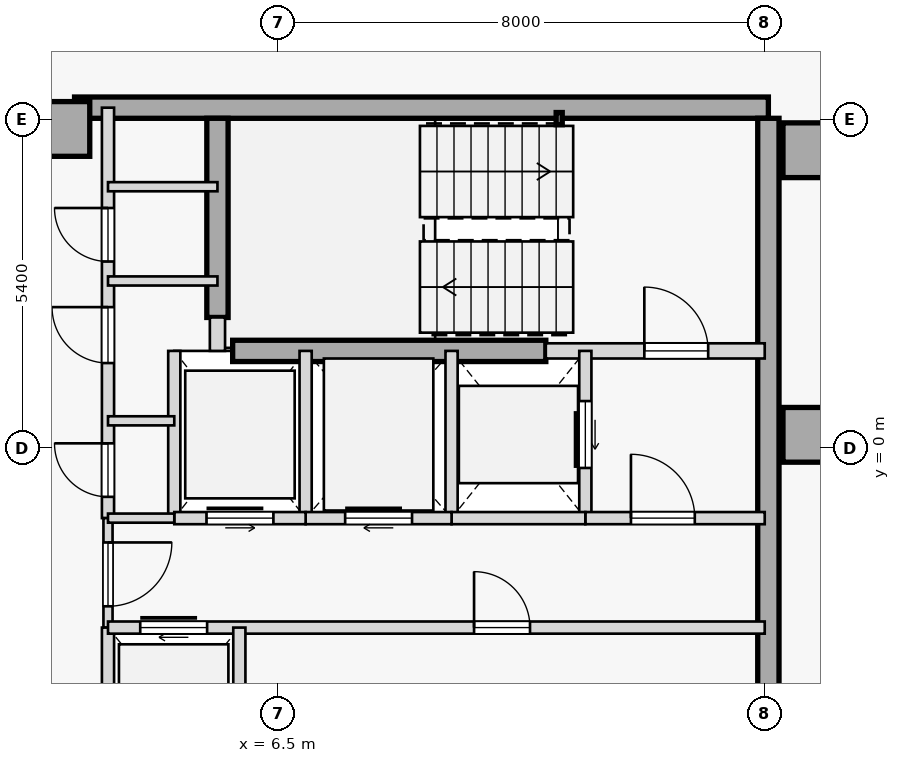
"""IFC4 building model, lengths in metres.
Left out: names, types, materials, properties, quantities, classifications, styles, units other than length and angle.
Written with IfcOpenShell. Run it as: python <this file> out.ifc"""

import sys

from ifc_helpers import new_model, si_unit, direction, frame, frame_2d, origin, origin_2d, place, context, subcontext, project, spatial, rectangle, hollow_rectangle, extrude, element, fill, save


model = new_model("IFC4")
c1 = context("Model", 3, precision=1e-05, world=origin(), true_north=direction((0.0, 1.0)))
c2 = subcontext(c1, "Body", "Model", "MODEL_VIEW")
j1 = project(units=[si_unit("LENGTHUNIT", "METRE"), si_unit("PLANEANGLEUNIT", "RADIAN")], contexts=[c1])
p1 = place(None, origin())
s1 = spatial("IfcSite", under=j1, at=p1, CompositionType="ELEMENT")
p2 = place(p1, origin())
s2 = spatial("IfcBuilding", under=s1, at=p2, CompositionType="ELEMENT")
p3 = place(p2, frame((0.0, 0.0, 298.65)))
s3 = spatial("IfcBuildingStorey", under=s2, at=p3, CompositionType="ELEMENT", Elevation=298.65)
for number, where, z_axis, x_axis in (
    (1, (15.25, 4.9, 0.0), (0.0, 0.0, 1.0), (1.0, 0.0, 0.0)),
    (2, (15.25, 0.22, 0.0), (0.0, 0.0, 1.0), (1.0, 0.0, 0.0)),
    (3, (2.95, 5.25, 0.0), (0.0, 0.0, 1.0), (1.0, 0.0, 0.0)),
):
    element("IfcColumn", number, at=place(p3, frame(where, z_axis=z_axis, x_axis=x_axis)), inside=s3, PredefinedType="COLUMN", context=c2, shape_type="SweptSolid", body=[
        extrude(rectangle(XDim=0.9, YDim=0.9, at=origin_2d()), origin(), (0.0, 0.0, 1.0), 3.35),
    ])
p4 = place(p3, frame((3.15, 5.6, 0.0), z_axis=(0.0, 0.0, 1.0), x_axis=(1.0, 0.0, 0.0)))
e4 = element("IfcWall", 4, at=p4, inside=s3, PredefinedType="SHEAR", context=c2, shape_type="SweptSolid", body=[
    extrude(rectangle(XDim=11.41, YDim=0.35, at=frame_2d((5.705, 0.0))), origin(), (0.0, 0.0, 1.0), 3.125),
])
p5 = place(p3, frame((14.56, -5.425, 0.0), z_axis=(0.0, 0.0, 1.0), x_axis=(0.0, 1.0, 0.0)))
e5 = element("IfcWall", 5, at=p5, inside=s3, PredefinedType="SHEAR", context=c2, shape_type="SweptSolid", body=[
    extrude(rectangle(XDim=10.85, YDim=0.35, at=frame_2d((5.425, 0.0))), origin(), (0.0, 0.0, 1.0), 3.125),
])
p6 = place(p3, frame((5.5, 2.15, 0.0), z_axis=(0.0, 0.0, 1.0), x_axis=(0.0, 1.0, 0.0)))
e6 = element("IfcWall", 6, at=p6, inside=s3, PredefinedType="SHEAR", context=c2, shape_type="SweptSolid", body=[
    extrude(rectangle(XDim=3.275, YDim=0.35, at=frame_2d((1.638, 0.0))), origin(), (0.0, 0.0, 1.0), 3.125),
])
p7 = place(p3, frame((5.75, 1.6, 0.0), z_axis=(0.0, 0.0, 1.0), x_axis=(1.0, 0.0, 0.0)))
e7 = element("IfcWall", 7, at=p7, inside=s3, PredefinedType="SHEAR", context=c2, shape_type="SweptSolid", body=[
    extrude(rectangle(XDim=5.15, YDim=0.35, at=frame_2d((2.575, 0.0))), origin(), (0.0, 0.0, 1.0), 3.125),
])
p8 = place(p3, frame((11.12, 5.42, 0.0), z_axis=(0.0, 0.0, 1.0), x_axis=(1.0, 0.0, 0.0)))
e8 = element("IfcColumn", 8, at=p8, inside=s3, PredefinedType="COLUMN", context=c2, shape_type="SweptSolid", body=[
    extrude(hollow_rectangle(XDim=0.1, YDim=0.2, WallThickness=0.008, at=origin_2d()), origin(), (0.0, 0.0, 1.0), 3.35),
])
p9 = place(p3, frame((10.9, 1.6, 0.0), z_axis=(0.0, 0.0, 1.0), x_axis=(1.0, 0.0, 0.0)))
e9 = element("IfcWall", 9, at=p9, inside=s3, PredefinedType="STANDARD", context=c2, shape_type="SweptSolid", body=[
    extrude(rectangle(XDim=3.6, YDim=0.25, at=frame_2d((1.8, 0.0))), origin(), (0.0, 0.0, 1.0), 3.125),
])
p10 = place(p9, frame((1.62, 0.0, 0.0)))
e10 = element("IfcOpeningElement", 10, at=p10, cuts=e9, PredefinedType="OPENING", context=c2, shape_type="SweptSolid", body=[
    extrude(rectangle(XDim=1.05, YDim=2.15, at=frame_2d((0.525, 1.075))), frame((0.0, 0.135, 0.0), z_axis=(0.0, -1.0, 0.0), x_axis=(1.0, 0.0, 0.0)), (0.0, 0.0, 1.0), 0.27),
])
p11 = place(p3, frame((5.5, 1.6, 0.0), z_axis=(0.0, 0.0, 1.0), x_axis=(0.0, 1.0, 0.0)))
e11 = element("IfcWall", 11, at=p11, inside=s3, PredefinedType="STANDARD", context=c2, shape_type="SweptSolid", body=[
    extrude(rectangle(XDim=0.55, YDim=0.25, at=frame_2d((0.275, 0.0))), origin(), (0.0, 0.0, 1.0), 3.125),
])
p12 = place(p3, frame((3.7, -1.15, 0.0), z_axis=(0.0, 0.0, 1.0), x_axis=(0.0, 1.0, 0.0)))
e12 = element("IfcWall", 12, at=p12, inside=s3, PredefinedType="STANDARD", context=c2, shape_type="SweptSolid", body=[
    extrude(rectangle(XDim=6.75, YDim=0.2, at=frame_2d((3.375, 0.0))), origin(), (0.0, 0.0, 1.0), 3.125),
])
p13 = place(p12, frame((0.35, 0.0, 0.0)))
e13 = element("IfcOpeningElement", 13, at=p13, cuts=e12, PredefinedType="OPENING", context=c2, shape_type="SweptSolid", body=[
    extrude(rectangle(XDim=0.88, YDim=2.15, at=frame_2d((0.44, 1.075))), frame((0.0, 0.11, 0.0), z_axis=(0.0, -1.0, 0.0), x_axis=(1.0, 0.0, 0.0)), (0.0, 0.0, 1.0), 0.22),
])
p14 = place(p12, frame((2.55, 0.0, 0.0)))
e14 = element("IfcOpeningElement", 14, at=p14, cuts=e12, PredefinedType="OPENING", context=c2, shape_type="SweptSolid", body=[
    extrude(rectangle(XDim=0.92, YDim=2.15, at=frame_2d((0.46, 1.075))), frame((0.0, 0.11, 0.0), z_axis=(0.0, -1.0, 0.0), x_axis=(1.0, 0.0, 0.0)), (0.0, 0.0, 1.0), 0.22),
])
p15 = place(p12, frame((4.22, 0.0, 0.0)))
e15 = element("IfcOpeningElement", 15, at=p15, cuts=e12, PredefinedType="OPENING", context=c2, shape_type="SweptSolid", body=[
    extrude(rectangle(XDim=0.88, YDim=2.15, at=frame_2d((0.44, 1.075))), frame((0.0, 0.11, 0.0), z_axis=(0.0, -1.0, 0.0), x_axis=(1.0, 0.0, 0.0)), (0.0, 0.0, 1.0), 0.22),
])
p16 = place(p3, frame((3.7, -2.95, 0.0), z_axis=(0.0, 0.0, 1.0), x_axis=(0.0, 1.0, 0.0)))
e16 = element("IfcWall", 16, at=p16, inside=s3, PredefinedType="PARTITIONING", context=c2, shape_type="SweptSolid", body=[
    extrude(rectangle(XDim=1.8, YDim=0.15, at=frame_2d((0.9, 0.0))), origin(), (0.0, 0.0, 1.0), 3.125),
])
p17 = place(p16, frame((0.35, 0.0, 0.0)))
e17 = element("IfcOpeningElement", 17, at=p17, cuts=e16, PredefinedType="OPENING", context=c2, shape_type="SweptSolid", body=[
    extrude(rectangle(XDim=1.05, YDim=2.18, at=frame_2d((0.525, 1.09))), frame((0.0, 0.085, 0.0), z_axis=(0.0, -1.0, 0.0), x_axis=(1.0, 0.0, 0.0)), (0.0, 0.0, 1.0), 0.17),
])
p18 = place(p3, frame((3.7, -5.6, 0.0), z_axis=(0.0, 0.0, 1.0), x_axis=(0.0, 1.0, 0.0)))
e18 = element("IfcWall", 18, at=p18, inside=s3, PredefinedType="STANDARD", context=c2, shape_type="SweptSolid", body=[
    extrude(rectangle(XDim=2.65, YDim=0.2, at=frame_2d((1.325, 0.0))), origin(), (0.0, 0.0, 1.0), 3.125),
])
p19 = place(p3, frame((11.55, -1.15, 0.0), z_axis=(0.0, 0.0, 1.0), x_axis=(0.0, 1.0, 0.0)))
e19 = element("IfcWall", 19, at=p19, inside=s3, PredefinedType="STANDARD", context=c2, shape_type="SweptSolid", body=[
    extrude(rectangle(XDim=2.75, YDim=0.2, at=frame_2d((1.375, 0.0))), origin(), (0.0, 0.0, 1.0), 3.125),
])
p20 = place(p19, frame((0.825, 0.0, 0.0)))
e20 = element("IfcOpeningElement", 20, at=p20, cuts=e19, PredefinedType="OPENING", context=c2, shape_type="SweptSolid", body=[
    extrude(rectangle(XDim=1.1, YDim=2.15, at=frame_2d((0.55, 1.075))), frame((0.0, 0.11, 0.0), z_axis=(0.0, -1.0, 0.0), x_axis=(1.0, 0.0, 0.0)), (0.0, 0.0, 1.0), 0.22),
])
p21 = place(p3, frame((9.35, -1.15, 0.0), z_axis=(0.0, 0.0, 1.0), x_axis=(0.0, 1.0, 0.0)))
e21 = element("IfcWall", 21, at=p21, inside=s3, PredefinedType="STANDARD", context=c2, shape_type="SweptSolid", body=[
    extrude(rectangle(XDim=2.75, YDim=0.2, at=frame_2d((1.375, 0.0))), origin(), (0.0, 0.0, 1.0), 3.125),
])
p22 = place(p3, frame((11.55, -1.15, 0.0), z_axis=(0.0, 0.0, 1.0), x_axis=(1.0, 0.0, 0.0)))
e22 = element("IfcWall", 22, at=p22, inside=s3, PredefinedType="STANDARD", context=c2, shape_type="SweptSolid", body=[
    extrude(rectangle(XDim=2.95, YDim=0.2, at=frame_2d((1.475, 0.0))), origin(), (0.0, 0.0, 1.0), 3.125),
])
p23 = place(p22, frame((0.75, 0.0, 0.0)))
e23 = element("IfcOpeningElement", 23, at=p23, cuts=e22, PredefinedType="OPENING", context=c2, shape_type="SweptSolid", body=[
    extrude(rectangle(XDim=1.05, YDim=2.18, at=frame_2d((0.525, 1.09))), frame((0.0, 0.11, 0.0), z_axis=(0.0, -1.0, 0.0), x_axis=(1.0, 0.0, 0.0)), (0.0, 0.0, 1.0), 0.22),
])
p24 = place(p3, frame((9.35, -1.15, 0.0), z_axis=(0.0, 0.0, 1.0), x_axis=(1.0, 0.0, 0.0)))
e24 = element("IfcWall", 24, at=p24, inside=s3, PredefinedType="STANDARD", context=c2, shape_type="SweptSolid", body=[
    extrude(rectangle(XDim=2.2, YDim=0.2, at=frame_2d((1.1, 0.0))), origin(), (0.0, 0.0, 1.0), 3.125),
])
p25 = place(p3, frame((6.95, -1.15, 0.0), z_axis=(0.0, 0.0, 1.0), x_axis=(0.0, 1.0, 0.0)))
e25 = element("IfcWall", 25, at=p25, inside=s3, PredefinedType="STANDARD", context=c2, shape_type="SweptSolid", body=[
    extrude(rectangle(XDim=2.75, YDim=0.2, at=frame_2d((1.375, 0.0))), origin(), (0.0, 0.0, 1.0), 3.125),
])
p26 = place(p3, frame((6.95, -1.15, 0.0), z_axis=(0.0, 0.0, 1.0), x_axis=(1.0, 0.0, 0.0)))
e26 = element("IfcWall", 26, at=p26, inside=s3, PredefinedType="STANDARD", context=c2, shape_type="SweptSolid", body=[
    extrude(rectangle(XDim=2.4, YDim=0.2, at=frame_2d((1.2, 0.0))), origin(), (0.0, 0.0, 1.0), 3.125),
])
p27 = place(p26, frame((0.65, 0.0, 0.0)))
e27 = element("IfcOpeningElement", 27, at=p27, cuts=e26, PredefinedType="OPENING", context=c2, shape_type="SweptSolid", body=[
    extrude(rectangle(XDim=1.1, YDim=2.15, at=frame_2d((0.55, 1.075))), frame((0.0, 0.11, 0.0), z_axis=(0.0, -1.0, 0.0), x_axis=(1.0, 0.0, 0.0)), (0.0, 0.0, 1.0), 0.22),
])
p28 = place(p3, frame((4.79, -1.15, 0.0), z_axis=(0.0, 0.0, 1.0), x_axis=(0.0, 1.0, 0.0)))
e28 = element("IfcWall", 28, at=p28, inside=s3, PredefinedType="STANDARD", context=c2, shape_type="SweptSolid", body=[
    extrude(rectangle(XDim=2.75, YDim=0.2, at=frame_2d((1.375, 0.0))), origin(), (0.0, 0.0, 1.0), 3.125),
])
p29 = place(p3, frame((4.79, -1.15, 0.0), z_axis=(0.0, 0.0, 1.0), x_axis=(1.0, 0.0, 0.0)))
e29 = element("IfcWall", 29, at=p29, inside=s3, PredefinedType="STANDARD", context=c2, shape_type="SweptSolid", body=[
    extrude(rectangle(XDim=2.16, YDim=0.2, at=frame_2d((1.08, 0.0))), origin(), (0.0, 0.0, 1.0), 3.125),
])
p30 = place(p29, frame((0.53, 0.0, 0.0)))
e30 = element("IfcOpeningElement", 30, at=p30, cuts=e29, PredefinedType="OPENING", context=c2, shape_type="SweptSolid", body=[
    extrude(rectangle(XDim=1.1, YDim=2.15, at=frame_2d((0.55, 1.075))), frame((0.0, 0.11, 0.0), z_axis=(0.0, -1.0, 0.0), x_axis=(1.0, 0.0, 0.0)), (0.0, 0.0, 1.0), 0.22),
])
p31 = place(p3, frame((3.7, -1.15, 0.0), z_axis=(0.0, 0.0, 1.0), x_axis=(1.0, 0.0, 0.0)))
e31 = element("IfcWall", 31, at=p31, inside=s3, PredefinedType="PARTITIONING", context=c2, shape_type="SweptSolid", body=[
    extrude(rectangle(XDim=1.09, YDim=0.15, at=frame_2d((0.545, 0.0))), origin(), (0.0, 0.0, 1.0), 3.125),
])
p32 = place(p3, frame((3.7, -2.95, 0.0), z_axis=(0.0, 0.0, 1.0), x_axis=(1.0, 0.0, 0.0)))
e32 = element("IfcWall", 32, at=p32, inside=s3, PredefinedType="STANDARD", context=c2, shape_type="SweptSolid", body=[
    extrude(rectangle(XDim=10.8, YDim=0.2, at=frame_2d((5.4, 0.0))), origin(), (0.0, 0.0, 1.0), 3.125),
])
p33 = place(p32, frame((0.53, 0.0, 0.0)))
e33 = element("IfcOpeningElement", 33, at=p33, cuts=e32, PredefinedType="OPENING", context=c2, shape_type="SweptSolid", body=[
    extrude(rectangle(XDim=1.1, YDim=2.15, at=frame_2d((0.55, 1.075))), frame((0.0, 0.11, 0.0), z_axis=(0.0, -1.0, 0.0), x_axis=(1.0, 0.0, 0.0)), (0.0, 0.0, 1.0), 0.22),
])
p34 = place(p32, frame((6.02, 0.0, 0.0)))
e34 = element("IfcOpeningElement", 34, at=p34, cuts=e32, PredefinedType="OPENING", context=c2, shape_type="SweptSolid", body=[
    extrude(rectangle(XDim=0.92, YDim=2.15, at=frame_2d((0.46, 1.075))), frame((0.0, 0.11, 0.0), z_axis=(0.0, -1.0, 0.0), x_axis=(1.0, 0.0, 0.0)), (0.0, 0.0, 1.0), 0.22),
])
p35 = place(p3, frame((5.86, -5.6, 0.0), z_axis=(0.0, 0.0, 1.0), x_axis=(0.0, 1.0, 0.0)))
e35 = element("IfcWall", 35, at=p35, inside=s3, PredefinedType="STANDARD", context=c2, shape_type="SweptSolid", body=[
    extrude(rectangle(XDim=2.65, YDim=0.2, at=frame_2d((1.325, 0.0))), origin(), (0.0, 0.0, 1.0), 3.125),
])
p36 = place(p3, frame((3.7, 4.3, 0.0), z_axis=(0.0, 0.0, 1.0), x_axis=(1.0, 0.0, 0.0)))
e36 = element("IfcWall", 36, at=p36, inside=s3, PredefinedType="PARTITIONING", context=c2, shape_type="SweptSolid", body=[
    extrude(rectangle(XDim=1.8, YDim=0.15, at=frame_2d((0.9, 0.0))), origin(), (0.0, 0.0, 1.0), 3.125),
])
p37 = place(p3, frame((3.7, 0.45, 0.0), z_axis=(0.0, 0.0, 1.0), x_axis=(1.0, 0.0, 0.0)))
e37 = element("IfcWall", 37, at=p37, inside=s3, PredefinedType="PARTITIONING", context=c2, shape_type="SweptSolid", body=[
    extrude(rectangle(XDim=1.09, YDim=0.15, at=frame_2d((0.545, 0.0))), origin(), (0.0, 0.0, 1.0), 3.125),
])
p38 = place(p3, frame((3.7, 2.75, 0.0), z_axis=(0.0, 0.0, 1.0), x_axis=(1.0, 0.0, 0.0)))
e38 = element("IfcWall", 38, at=p38, inside=s3, PredefinedType="PARTITIONING", context=c2, shape_type="SweptSolid", body=[
    extrude(rectangle(XDim=1.8, YDim=0.15, at=frame_2d((0.9, 0.0))), origin(), (0.0, 0.0, 1.0), 3.125),
])
p39 = place(p3, frame((17.047, 5.052, 0.0), z_axis=(0.0, 0.0, 1.0), x_axis=(-0.406752543172, 0.913538378298, 0.0)))
e39 = element("IfcWall", 39, at=p39, inside=s3, PredefinedType="PARTITIONING", context=c2, shape_type="SweptSolid", body=[
    extrude(rectangle(XDim=7.561, YDim=0.15, at=frame_2d((3.781, 0.0))), origin(), (0.0, 0.0, 1.0), 3.125),
])
p40 = place(p10, origin())
e40 = element("IfcDoor", 40, at=p40, inside=s3, OperationType="SINGLE_SWING_LEFT", PredefinedType="DOOR", context=c2, shape_type="SweptSolid", body=[
    extrude(rectangle(XDim=1.05, YDim=2.15, at=frame_2d((0.525, 1.075))), frame((0.0, 0.025, 0.0), z_axis=(0.0, -1.0, 0.0), x_axis=(1.0, 0.0, 0.0)), (0.0, 0.0, 1.0), 0.05),
])
fill(e10, e40)
p41 = place(p23, origin())
e41 = element("IfcDoor", 41, at=p41, inside=s3, OperationType="SINGLE_SWING_LEFT", PredefinedType="DOOR", context=c2, shape_type="SweptSolid", body=[
    extrude(rectangle(XDim=1.05, YDim=2.18, at=frame_2d((0.525, 1.09))), frame((0.0, 0.025, 0.0), z_axis=(0.0, -1.0, 0.0), x_axis=(1.0, 0.0, 0.0)), (0.0, 0.0, 1.0), 0.05),
])
fill(e23, e41)
p42 = place(p17, frame((1.05, 0.0, 0.0), z_axis=(0.0, 0.0, 1.0), x_axis=(-1.0, 0.0, 0.0)))
e42 = element("IfcDoor", 42, at=p42, inside=s3, OperationType="SINGLE_SWING_RIGHT", PredefinedType="DOOR", context=c2, shape_type="SweptSolid", body=[
    extrude(rectangle(XDim=1.05, YDim=2.18, at=frame_2d((0.525, 1.09))), frame((0.0, 0.025, 0.0), z_axis=(0.0, -1.0, 0.0), x_axis=(1.0, 0.0, 0.0)), (0.0, 0.0, 1.0), 0.05),
])
fill(e17, e42)
p43 = place(p20, origin())
e43 = element("IfcDoor", 43, at=p43, inside=s3, OperationType="SLIDING_TO_RIGHT", PredefinedType="DOOR", context=c2, shape_type="SweptSolid", body=[
    extrude(rectangle(XDim=1.1, YDim=2.15, at=frame_2d((0.55, 1.075))), frame((0.0, 0.025, 0.0), z_axis=(0.0, -1.0, 0.0), x_axis=(1.0, 0.0, 0.0)), (0.0, 0.0, 1.0), 0.05),
])
fill(e20, e43)
p44 = place(p27, origin())
e44 = element("IfcDoor", 44, at=p44, inside=s3, OperationType="SLIDING_TO_RIGHT", PredefinedType="DOOR", context=c2, shape_type="SweptSolid", body=[
    extrude(rectangle(XDim=1.1, YDim=2.15, at=frame_2d((0.55, 1.075))), frame((0.0, 0.025, 0.0), z_axis=(0.0, -1.0, 0.0), x_axis=(1.0, 0.0, 0.0)), (0.0, 0.0, 1.0), 0.05),
])
fill(e27, e44)
p45 = place(p30, origin())
e45 = element("IfcDoor", 45, at=p45, inside=s3, OperationType="SLIDING_TO_LEFT", PredefinedType="DOOR", context=c2, shape_type="SweptSolid", body=[
    extrude(rectangle(XDim=1.1, YDim=2.15, at=frame_2d((0.55, 1.075))), frame((0.0, 0.025, 0.0), z_axis=(0.0, -1.0, 0.0), x_axis=(1.0, 0.0, 0.0)), (0.0, 0.0, 1.0), 0.05),
])
fill(e30, e45)
p46 = place(p33, origin())
e46 = element("IfcDoor", 46, at=p46, inside=s3, OperationType="SLIDING_TO_RIGHT", PredefinedType="DOOR", context=c2, shape_type="SweptSolid", body=[
    extrude(rectangle(XDim=1.1, YDim=2.15, at=frame_2d((0.55, 1.075))), frame((0.0, 0.025, 0.0), z_axis=(0.0, -1.0, 0.0), x_axis=(1.0, 0.0, 0.0)), (0.0, 0.0, 1.0), 0.05),
])
fill(e33, e46)
p47 = place(p34, origin())
e47 = element("IfcDoor", 47, at=p47, inside=s3, OperationType="SINGLE_SWING_LEFT", PredefinedType="DOOR", context=c2, shape_type="SweptSolid", body=[
    extrude(rectangle(XDim=0.92, YDim=2.15, at=frame_2d((0.46, 1.075))), frame((0.0, 0.025, 0.0), z_axis=(0.0, -1.0, 0.0), x_axis=(1.0, 0.0, 0.0)), (0.0, 0.0, 1.0), 0.05),
])
fill(e34, e47)
p48 = place(p13, origin())
e48 = element("IfcDoor", 48, at=p48, inside=s3, OperationType="SINGLE_SWING_RIGHT", PredefinedType="DOOR", context=c2, shape_type="SweptSolid", body=[
    extrude(rectangle(XDim=0.88, YDim=2.15, at=frame_2d((0.44, 1.075))), frame((0.0, 0.025, 0.0), z_axis=(0.0, -1.0, 0.0), x_axis=(1.0, 0.0, 0.0)), (0.0, 0.0, 1.0), 0.05),
])
fill(e13, e48)
p49 = place(p14, origin())
e49 = element("IfcDoor", 49, at=p49, inside=s3, OperationType="SINGLE_SWING_RIGHT", PredefinedType="DOOR", context=c2, shape_type="SweptSolid", body=[
    extrude(rectangle(XDim=0.92, YDim=2.15, at=frame_2d((0.46, 1.075))), frame((0.0, 0.025, 0.0), z_axis=(0.0, -1.0, 0.0), x_axis=(1.0, 0.0, 0.0)), (0.0, 0.0, 1.0), 0.05),
])
fill(e14, e49)
p50 = place(p15, origin())
e50 = element("IfcDoor", 50, at=p50, inside=s3, OperationType="SINGLE_SWING_RIGHT", PredefinedType="DOOR", context=c2, shape_type="SweptSolid", body=[
    extrude(rectangle(XDim=0.88, YDim=2.15, at=frame_2d((0.44, 1.075))), frame((0.0, 0.025, 0.0), z_axis=(0.0, -1.0, 0.0), x_axis=(1.0, 0.0, 0.0)), (0.0, 0.0, 1.0), 0.05),
])
fill(e15, e50)
save(model, sys.argv[1])
